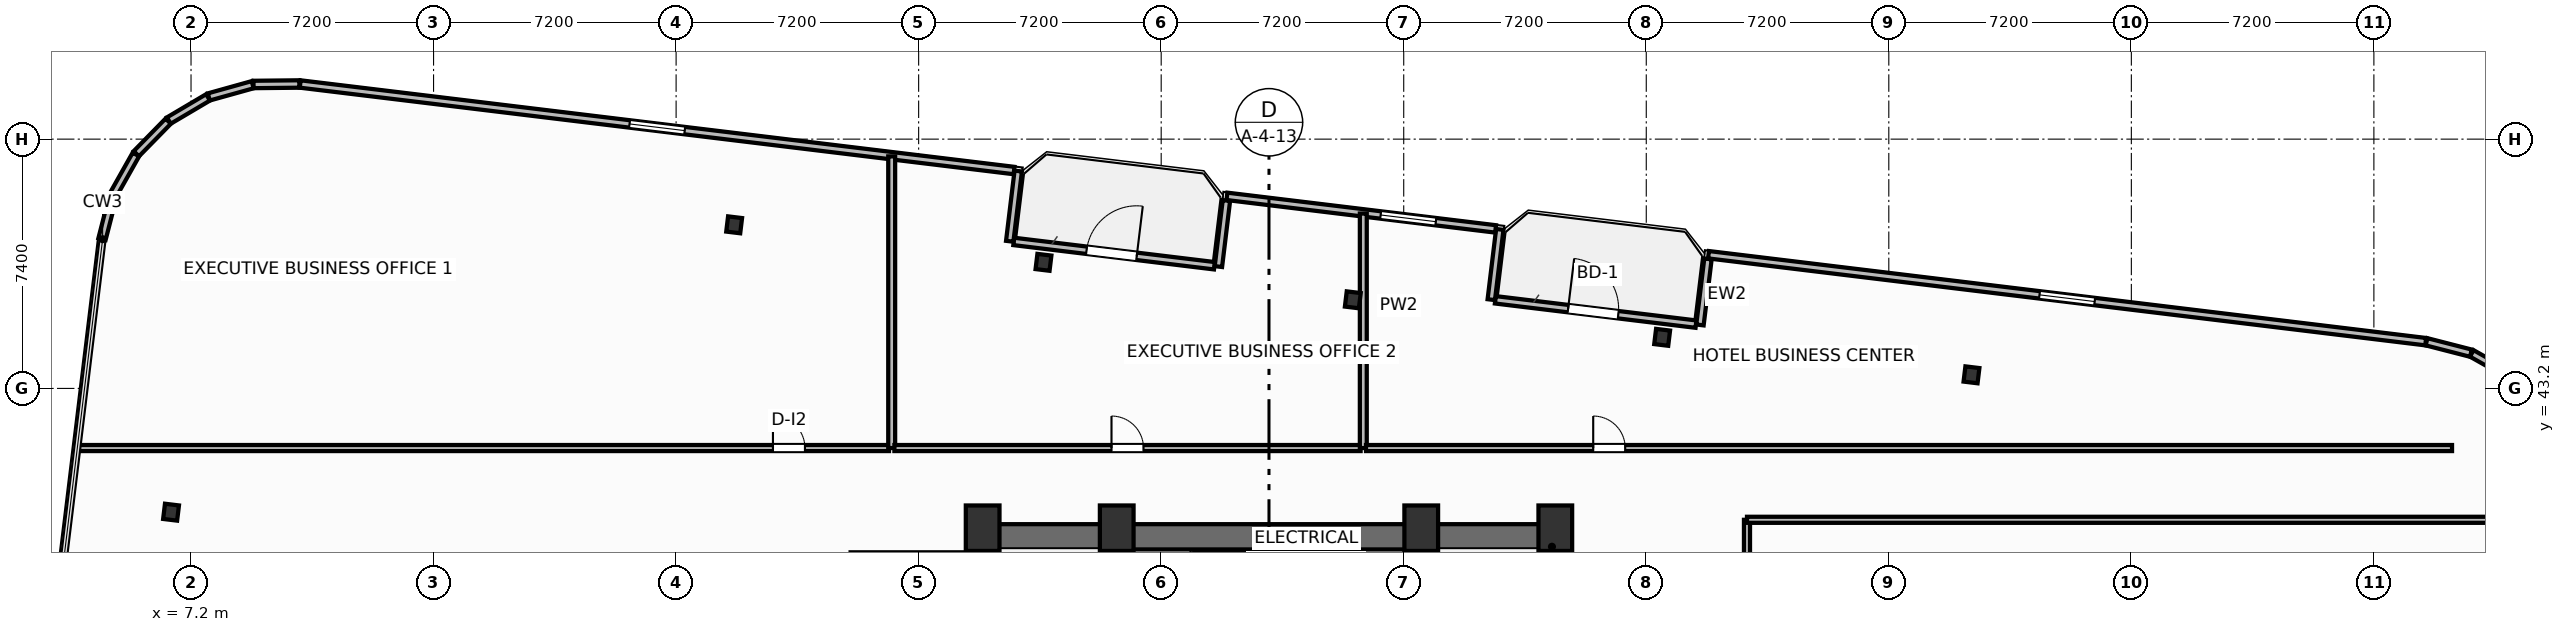
"""IFC4 building model, lengths in metres.
Left out: names, types, materials, properties, quantities, classifications, styles, units other than length and angle.
Written with IfcOpenShell. Run it as: python <this file> out.ifc"""

import sys

from ifc_helpers import new_model, si_unit, direction, frame, frame_2d, origin, origin_2d, place, context, subcontext, project, spatial, rectangle, i_section, extrude, element, fill, save


model = new_model("IFC4")
c1 = context("Model", 3, precision=1e-05, world=origin(), true_north=direction((0.0, 1.0)))
c2 = subcontext(c1, "Body", "Model", "MODEL_VIEW")
j1 = project(units=[si_unit("LENGTHUNIT", "METRE"), si_unit("PLANEANGLEUNIT", "RADIAN")], contexts=[c1])
p1 = place(None, origin())
s1 = spatial("IfcSite", under=j1, at=p1, CompositionType="ELEMENT")
p2 = place(p1, origin())
s2 = spatial("IfcBuilding", under=s1, at=p2, CompositionType="ELEMENT")
p3 = place(p2, frame((0.0, 0.0, 132.8)))
s3 = spatial("IfcBuildingStorey", under=s2, at=p3, CompositionType="ELEMENT", Elevation=132.8)
for number, where, z_axis, x_axis in (
    (1, (30.7, 39.05, 0.0), (0.0, 0.0, 1.0), (1.0, 0.0, 0.0)),
    (2, (34.68, 39.05, 0.0), (0.0, 0.0, 1.0), (1.0, 0.0, 0.0)),
    (3, (43.72, 39.05, 0.0), (0.0, 0.0, 1.0), (1.0, 0.0, 0.0)),
    (4, (47.7, 39.05, 0.0), (0.0, 0.0, 1.0), (1.0, 0.0, 0.0)),
):
    element("IfcColumn", number, at=place(p3, frame(where, z_axis=z_axis, x_axis=x_axis)), inside=s3, PredefinedType="COLUMN", context=c2, shape_type="SweptSolid", body=[
        extrude(rectangle(XDim=1.0, YDim=1.35, at=origin_2d()), origin(), (0.0, 0.0, 1.0), 3.7),
    ])
p4 = place(p3, frame((30.38, 38.795, 0.0), z_axis=(0.0, 0.0, 1.0), x_axis=(1.0, 0.0, 0.0)))
e5 = element("IfcWall", 5, at=p4, inside=s3, PredefinedType="SHEAR", context=c2, shape_type="SweptSolid", body=[
    extrude(rectangle(XDim=17.64, YDim=0.75, at=frame_2d((8.82, 0.0))), origin(), (0.0, 0.0, 1.0), 3.45),
])
for number, where, z_axis, x_axis in (
    (6, (30.755, 29.2, 0.0), (0.0, 0.0, 1.0), (0.0, 1.0, 0.0)),
    (7, (47.645, 29.2, 0.0), (0.0, 0.0, 1.0), (0.0, 1.0, 0.0)),
):
    element("IfcWall", number, at=place(p3, frame(where, z_axis=z_axis, x_axis=x_axis)), inside=s3, PredefinedType="SHEAR", context=c2, shape_type="SweptSolid", body=[
        extrude(rectangle(XDim=9.22, YDim=0.75, at=frame_2d((4.61, 0.0))), origin(), (0.0, 0.0, 1.0), 3.45),
    ])
p5 = place(p3, frame((34.64, 29.2, 0.0), z_axis=(0.0, 0.0, 1.0), x_axis=(0.0, 1.0, 0.0)))
e8 = element("IfcWall", 8, at=p5, inside=s3, PredefinedType="SHEAR", context=c2, shape_type="SweptSolid", body=[
    extrude(rectangle(XDim=9.22, YDim=0.25, at=frame_2d((4.61, 0.0))), origin(), (0.0, 0.0, 1.0), 3.45),
])
p6 = place(p5, frame((0.65, 0.0, 0.0)))
e9 = element("IfcOpeningElement", 9, at=p6, cuts=e8, PredefinedType="OPENING", context=c2, shape_type="SweptSolid", body=[
    extrude(rectangle(XDim=1.05, YDim=2.15, at=frame_2d((0.525, 1.075))), frame((0.0, 0.135, 0.0), z_axis=(0.0, -1.0, 0.0), x_axis=(1.0, 0.0, 0.0)), (0.0, 0.0, 1.0), 0.27),
])
p7 = place(p3, frame((43.76, 29.2, 0.0), z_axis=(0.0, 0.0, 1.0), x_axis=(0.0, 1.0, 0.0)))
e10 = element("IfcWall", 10, at=p7, inside=s3, PredefinedType="SHEAR", context=c2, shape_type="SweptSolid", body=[
    extrude(rectangle(XDim=9.22, YDim=0.25, at=frame_2d((4.61, 0.0))), origin(), (0.0, 0.0, 1.0), 3.45),
])
p8 = place(p7, frame((0.65, 0.0, 0.0)))
e11 = element("IfcOpeningElement", 11, at=p8, cuts=e10, PredefinedType="OPENING", context=c2, shape_type="SweptSolid", body=[
    extrude(rectangle(XDim=1.05, YDim=2.15, at=frame_2d((0.525, 1.075))), frame((0.0, 0.135, 0.0), z_axis=(0.0, -1.0, 0.0), x_axis=(1.0, 0.0, 0.0)), (0.0, 0.0, 1.0), 0.27),
])
for number, where, z_axis, x_axis in (
    (12, (60.054, 43.603, 0.0), (0.0, 0.0, 1.0), (0.993, -0.12, 0.0)),
    (13, (50.872, 44.717, 0.0), (0.0, 0.0, 1.0), (0.993, -0.12, 0.0)),
    (14, (41.689, 45.83, 0.0), (0.0, 0.0, 1.0), (0.993, -0.12, 0.0)),
    (15, (32.506, 46.943, 0.0), (0.0, 0.0, 1.0), (0.993, -0.12, 0.0)),
    (16, (23.323, 48.056, 0.0), (0.0, 0.0, 1.0), (0.993, -0.12, 0.0)),
    (17, (6.607, 39.526, 0.0), (0.0, 0.0, 1.0), (0.993, -0.12, 0.0)),
):
    element("IfcColumn", number, at=place(p3, frame(where, z_axis=z_axis, x_axis=x_axis)), inside=s3, PredefinedType="COLUMN", context=c2, shape_type="SweptSolid", body=[
        extrude(i_section(OverallWidth=0.418, OverallDepth=0.455, WebThickness=0.042, FlangeThickness=0.068, FilletRadius=0.025, at=origin_2d()), origin(), (0.0, 0.0, 1.0), 3.7),
    ])
p9 = place(p3, frame((31.624, 47.563, 0.0), z_axis=(0.0, 0.0, 1.0), x_axis=(0.992729951822, -0.120362962556, 0.0)))
e18 = element("IfcWall", 18, at=p9, inside=s3, PredefinedType="SOLIDWALL", context=c2, shape_type="SweptSolid", body=[
    extrude(rectangle(XDim=6.0, YDim=0.22, at=frame_2d((3.0, 0.0))), origin(), (0.0, 0.0, 1.0), 2.73),
])
p10 = place(p9, frame((2.176, 0.0, 0.0)))
e19 = element("IfcOpeningElement", 19, at=p10, cuts=e18, PredefinedType="OPENING", context=c2, shape_type="SweptSolid", body=[
    extrude(rectangle(XDim=1.5, YDim=2.25, at=frame_2d((0.75, 1.125))), frame((0.0, 0.12, 0.0), z_axis=(0.0, -1.0, 0.0), x_axis=(1.0, 0.0, 0.0)), (0.0, 0.0, 1.0), 0.24),
])
p11 = place(p3, frame((45.92, 45.831, 0.0), z_axis=(0.0, 0.0, 1.0), x_axis=(0.992729951822, -0.120362962556, 0.0)))
e20 = element("IfcWall", 20, at=p11, inside=s3, PredefinedType="SOLIDWALL", context=c2, shape_type="SweptSolid", body=[
    extrude(rectangle(XDim=6.0, YDim=0.22, at=frame_2d((3.0, 0.0))), origin(), (0.0, 0.0, 1.0), 2.73),
])
p12 = place(p11, frame((2.176, 0.0, 0.0)))
e21 = element("IfcOpeningElement", 21, at=p12, cuts=e20, PredefinedType="OPENING", context=c2, shape_type="SweptSolid", body=[
    extrude(rectangle(XDim=1.5, YDim=2.25, at=frame_2d((0.75, 1.125))), frame((0.0, 0.12, 0.0), z_axis=(0.0, -1.0, 0.0), x_axis=(1.0, 0.0, 0.0)), (0.0, 0.0, 1.0), 0.24),
])
p13 = place(p3, frame((76.084, 43.575, 0.0), z_axis=(0.0, 0.0, 1.0), x_axis=(-0.871093268227, 0.491117621399, 0.0)))
e22 = element("IfcWall", 22, at=p13, inside=s3, PredefinedType="SOLIDWALL", context=c2, shape_type="SweptSolid", body=[
    extrude(rectangle(XDim=1.353, YDim=0.22, at=frame_2d((0.677, 0.0))), origin(), (0.0, 0.0, 1.0), 2.73),
])
p14 = place(p3, frame((74.881, 44.246, 0.0), z_axis=(0.0, 0.0, 1.0), x_axis=(-0.968549775063, 0.248819881091, 0.0)))
e23 = element("IfcWall", 23, at=p14, inside=s3, PredefinedType="SOLIDWALL", context=c2, shape_type="SweptSolid", body=[
    extrude(rectangle(XDim=1.361, YDim=0.22, at=frame_2d((0.68, 0.0))), origin(), (0.0, 0.0, 1.0), 2.73),
])
p15 = place(p3, frame((73.538, 44.588, 0.0), z_axis=(0.0, 0.0, 1.0), x_axis=(-0.992733493583, 0.120333747213, 0.0)))
e24 = element("IfcWall", 24, at=p15, inside=s3, PredefinedType="SOLIDWALL", context=c2, shape_type="SweptSolid", body=[
    extrude(rectangle(XDim=21.447, YDim=0.22, at=frame_2d((10.724, 0.0))), origin(), (0.0, 0.0, 1.0), 2.73),
])
p16 = place(p15, frame((9.899, 0.0, 0.8)))
e25 = element("IfcOpeningElement", 25, at=p16, cuts=e24, PredefinedType="OPENING", context=c2, shape_type="SweptSolid", body=[
    extrude(rectangle(XDim=1.65, YDim=1.65, at=frame_2d((0.825, 0.825))), frame((0.0, 0.12, 0.0), z_axis=(0.0, -1.0, 0.0), x_axis=(1.0, 0.0, 0.0)), (0.0, 0.0, 1.0), 0.24),
])
p17 = place(p3, frame((52.231, 47.045, 0.0), z_axis=(0.0, 0.0, 1.0), x_axis=(-0.120275992932, -0.992740492538, 0.0)))
e26 = element("IfcWall", 26, at=p17, inside=s3, PredefinedType="SOLIDWALL", context=c2, shape_type="SweptSolid", body=[
    extrude(rectangle(XDim=1.975, YDim=0.22, at=frame_2d((0.988, 0.0))), origin(), (0.0, 0.0, 1.0), 2.73),
])
p18 = place(p3, frame((45.799, 45.835, 0.0), z_axis=(0.0, 0.0, 1.0), x_axis=(0.120314009587, 0.992735885871, 0.0)))
e27 = element("IfcWall", 27, at=p18, inside=s3, PredefinedType="SOLIDWALL", context=c2, shape_type="SweptSolid", body=[
    extrude(rectangle(XDim=2.1, YDim=0.22, at=frame_2d((1.05, 0.0))), origin(), (0.0, 0.0, 1.0), 2.73),
])
p19 = place(p3, frame((45.928, 47.935, 0.0), z_axis=(0.0, 0.0, 1.0), x_axis=(-0.992730591876, 0.120357683402, 0.0)))
e28 = element("IfcWall", 28, at=p19, inside=s3, PredefinedType="SOLIDWALL", context=c2, shape_type="SweptSolid", body=[
    extrude(rectangle(XDim=8.035, YDim=0.22, at=frame_2d((4.017, 0.0))), origin(), (0.0, 0.0, 1.0), 2.73),
])
p20 = place(p19, frame((1.788, 0.0, 0.8)))
e29 = element("IfcOpeningElement", 29, at=p20, cuts=e28, PredefinedType="OPENING", context=c2, shape_type="SweptSolid", body=[
    extrude(rectangle(XDim=1.65, YDim=1.65, at=frame_2d((0.825, 0.825))), frame((0.0, 0.12, 0.0), z_axis=(0.0, -1.0, 0.0), x_axis=(1.0, 0.0, 0.0)), (0.0, 0.0, 1.0), 0.24),
])
p21 = place(p3, frame((37.936, 48.778, 0.0), z_axis=(0.0, 0.0, 1.0), x_axis=(-0.120397815541, -0.992725725472, 0.0)))
e30 = element("IfcWall", 30, at=p21, inside=s3, PredefinedType="SOLIDWALL", context=c2, shape_type="SweptSolid", body=[
    extrude(rectangle(XDim=1.975, YDim=0.22, at=frame_2d((0.988, 0.0))), origin(), (0.0, 0.0, 1.0), 2.73),
])
p22 = place(p3, frame((31.504, 47.568, 0.0), z_axis=(0.0, 0.0, 1.0), x_axis=(0.120341784665, 0.992732519294, 0.0)))
e31 = element("IfcWall", 31, at=p22, inside=s3, PredefinedType="SOLIDWALL", context=c2, shape_type="SweptSolid", body=[
    extrude(rectangle(XDim=2.1, YDim=0.22, at=frame_2d((1.05, 0.0))), origin(), (0.0, 0.0, 1.0), 2.73),
])
p23 = place(p3, frame((31.633, 49.668, 0.0), z_axis=(0.0, 0.0, 1.0), x_axis=(-0.992731670483, 0.120348786531, 0.0)))
e32 = element("IfcWall", 32, at=p23, inside=s3, PredefinedType="SOLIDWALL", context=c2, shape_type="SweptSolid", body=[
    extrude(rectangle(XDim=21.347, YDim=0.22, at=frame_2d((10.674, 0.0))), origin(), (0.0, 0.0, 1.0), 2.73),
])
p24 = place(p23, frame((9.849, 0.0, 0.8)))
e33 = element("IfcOpeningElement", 33, at=p24, cuts=e32, PredefinedType="OPENING", context=c2, shape_type="SweptSolid", body=[
    extrude(rectangle(XDim=1.65, YDim=1.65, at=frame_2d((0.825, 0.825))), frame((0.0, 0.12, 0.0), z_axis=(0.0, -1.0, 0.0), x_axis=(1.0, 0.0, 0.0)), (0.0, 0.0, 1.0), 0.24),
])
p25 = place(p3, frame((10.416, 52.237, 0.0), z_axis=(0.0, 0.0, 1.0), x_axis=(-0.999947718056, -0.010225514878, 0.0)))
e34 = element("IfcWall", 34, at=p25, inside=s3, PredefinedType="SOLIDWALL", context=c2, shape_type="SweptSolid", body=[
    extrude(rectangle(XDim=1.361, YDim=0.22, at=frame_2d((0.68, 0.0))), origin(), (0.0, 0.0, 1.0), 2.73),
])
for number, where, z_axis, x_axis in (
    (35, (9.031, 52.216, 0.0), (0.0, 0.0, 1.0), (-0.963, -0.269, 0.0)),
    (36, (7.706, 51.84, 0.0), (0.0, 0.0, 1.0), (-0.861, -0.509, 0.0)),
):
    element("IfcWall", number, at=place(p3, frame(where, z_axis=z_axis, x_axis=x_axis)), inside=s3, PredefinedType="SOLIDWALL", context=c2, shape_type="SweptSolid", body=[
        extrude(rectangle(XDim=1.353, YDim=0.22, at=frame_2d((0.677, 0.0))), origin(), (0.0, 0.0, 1.0), 2.73),
    ])
p26 = place(p3, frame((6.523, 51.133, 0.0), z_axis=(0.0, 0.0, 1.0), x_axis=(-0.699762925925, -0.714375144795, 0.0)))
e37 = element("IfcWall", 37, at=p26, inside=s3, PredefinedType="SOLIDWALL", context=c2, shape_type="SweptSolid", body=[
    extrude(rectangle(XDim=1.353, YDim=0.22, at=frame_2d((0.677, 0.0))), origin(), (0.0, 0.0, 1.0), 2.73),
])
p27 = place(p3, frame((5.564, 50.145, 0.0), z_axis=(0.0, 0.0, 1.0), x_axis=(-0.491117621399, -0.871093268227, 0.0)))
e38 = element("IfcWall", 38, at=p27, inside=s3, PredefinedType="SOLIDWALL", context=c2, shape_type="SweptSolid", body=[
    extrude(rectangle(XDim=1.353, YDim=0.22, at=frame_2d((0.677, 0.0))), origin(), (0.0, 0.0, 1.0), 2.73),
])
p28 = place(p3, frame((4.894, 48.942, 0.0), z_axis=(0.0, 0.0, 1.0), x_axis=(-0.248857256909, -0.968540172468, 0.0)))
e39 = element("IfcWall", 39, at=p28, inside=s3, PredefinedType="SOLIDWALL", context=c2, shape_type="SweptSolid", body=[
    extrude(rectangle(XDim=1.353, YDim=0.22, at=frame_2d((0.676, 0.0))), origin(), (0.0, 0.0, 1.0), 2.73),
])
p29 = place(p3, frame((3.864, 41.43, 0.0), z_axis=(0.0, 0.0, 1.0), x_axis=(1.0, 0.0, 0.0)))
e40 = element("IfcWall", 40, at=p29, inside=s3, PredefinedType="PARTITIONING", context=c2, shape_type="SweptSolid", body=[
    extrude(rectangle(XDim=24.056, YDim=0.18, at=frame_2d((12.028, 0.0))), origin(), (0.0, 0.0, 1.0), 3.45),
])
p30 = place(p29, frame((20.611, 0.0, 0.0)))
e41 = element("IfcOpeningElement", 41, at=p30, cuts=e40, PredefinedType="OPENING", context=c2, shape_type="SweptSolid", body=[
    extrude(rectangle(XDim=0.95, YDim=2.05, at=frame_2d((0.475, 1.025))), frame((0.0, 0.1, 0.0), z_axis=(0.0, -1.0, 0.0), x_axis=(1.0, 0.0, 0.0)), (0.0, 0.0, 1.0), 0.2),
])
p31 = place(p3, frame((28.0, 41.43, 0.0), z_axis=(0.0, 0.0, 1.0), x_axis=(0.0, 1.0, 0.0)))
e42 = element("IfcWall", 42, at=p31, inside=s3, PredefinedType="PARTITIONING", context=c2, shape_type="SweptSolid", body=[
    extrude(rectangle(XDim=8.658, YDim=0.205, at=frame_2d((4.329, 0.0))), origin(), (0.0, 0.0, 1.0), 3.45),
])
p32 = place(p3, frame((28.08, 41.43, 0.0), z_axis=(0.0, 0.0, 1.0), x_axis=(1.0, 0.0, 0.0)))
e43 = element("IfcWall", 43, at=p32, inside=s3, PredefinedType="PARTITIONING", context=c2, shape_type="SweptSolid", body=[
    extrude(rectangle(XDim=13.84, YDim=0.18, at=frame_2d((6.92, 0.0))), origin(), (0.0, 0.0, 1.0), 3.45),
])
p33 = place(p32, frame((6.445, 0.0, 0.0)))
e44 = element("IfcOpeningElement", 44, at=p33, cuts=e43, PredefinedType="OPENING", context=c2, shape_type="SweptSolid", body=[
    extrude(rectangle(XDim=0.95, YDim=2.05, at=frame_2d((0.475, 1.025))), frame((0.0, 0.1, 0.0), z_axis=(0.0, -1.0, 0.0), x_axis=(1.0, 0.0, 0.0)), (0.0, 0.0, 1.0), 0.2),
])
p34 = place(p3, frame((42.0, 41.43, 0.0), z_axis=(0.0, 0.0, 1.0), x_axis=(0.0, 1.0, 0.0)))
e45 = element("IfcWall", 45, at=p34, inside=s3, PredefinedType="PARTITIONING", context=c2, shape_type="SweptSolid", body=[
    extrude(rectangle(XDim=6.961, YDim=0.205, at=frame_2d((3.48, 0.0))), origin(), (0.0, 0.0, 1.0), 2.662),
])
p35 = place(p3, frame((42.08, 41.43, 0.0), z_axis=(0.0, 0.0, 1.0), x_axis=(1.0, 0.0, 0.0)))
e46 = element("IfcWall", 46, at=p35, inside=s3, PredefinedType="PARTITIONING", context=c2, shape_type="SweptSolid", body=[
    extrude(rectangle(XDim=32.24, YDim=0.18, at=frame_2d((16.12, 0.0))), origin(), (0.0, 0.0, 1.0), 3.45),
])
p36 = place(p35, frame((6.745, 0.0, 0.0)))
e47 = element("IfcOpeningElement", 47, at=p36, cuts=e46, PredefinedType="OPENING", context=c2, shape_type="SweptSolid", body=[
    extrude(rectangle(XDim=0.95, YDim=2.05, at=frame_2d((0.475, 1.025))), frame((0.0, 0.1, 0.0), z_axis=(0.0, -1.0, 0.0), x_axis=(1.0, 0.0, 0.0)), (0.0, 0.0, 1.0), 0.2),
])
p37 = place(p3, frame((53.39, 19.24, 0.0), z_axis=(0.0, 0.0, 1.0), x_axis=(0.0, 1.0, 0.0)))
e48 = element("IfcWall", 48, at=p37, inside=s3, PredefinedType="PARTITIONING", context=c2, shape_type="SweptSolid", body=[
    extrude(rectangle(XDim=20.06, YDim=0.18, at=frame_2d((10.03, 0.0))), origin(), (0.0, 0.0, 1.0), 3.45),
])
p38 = place(p37, frame((7.7, 0.0, 0.0)))
e49 = element("IfcOpeningElement", 49, at=p38, cuts=e48, PredefinedType="OPENING", context=c2, shape_type="SweptSolid", body=[
    extrude(rectangle(XDim=0.95, YDim=2.05, at=frame_2d((0.475, 1.025))), frame((0.0, 0.1, 0.0), z_axis=(0.0, -1.0, 0.0), x_axis=(1.0, 0.0, 0.0)), (0.0, 0.0, 1.0), 0.2),
])
p39 = place(p3, frame((53.39, 39.3, 0.0), z_axis=(0.0, 0.0, 1.0), x_axis=(1.0, 0.0, 0.0)))
e50 = element("IfcWall", 50, at=p39, inside=s3, PredefinedType="PARTITIONING", context=c2, shape_type="SweptSolid", body=[
    extrude(rectangle(XDim=24.74, YDim=0.18, at=frame_2d((12.37, 0.0))), origin(), (0.0, 0.0, 1.0), 3.45),
])
p40 = place(p10, origin())
e51 = element("IfcDoor", 51, at=p40, inside=s3, OperationType="SINGLE_SWING_RIGHT", PredefinedType="DOOR", context=c2, shape_type="SweptSolid", body=[
    extrude(rectangle(XDim=1.5, YDim=2.25, at=frame_2d((0.75, 1.125))), frame((0.0, 0.025, 0.0), z_axis=(0.0, -1.0, 0.0), x_axis=(1.0, 0.0, 0.0)), (0.0, 0.0, 1.0), 0.05),
])
fill(e19, e51)
p41 = place(p12, origin())
e52 = element("IfcDoor", 52, at=p41, inside=s3, OperationType="SINGLE_SWING_LEFT", PredefinedType="DOOR", context=c2, shape_type="SweptSolid", body=[
    extrude(rectangle(XDim=1.5, YDim=2.25, at=frame_2d((0.75, 1.125))), frame((0.0, 0.025, 0.0), z_axis=(0.0, -1.0, 0.0), x_axis=(1.0, 0.0, 0.0)), (0.0, 0.0, 1.0), 0.05),
])
fill(e21, e52)
p42 = place(p16, origin())
e53 = element("IfcWindow", 53, at=p42, inside=s3, PartitioningType="SINGLE_PANEL", PredefinedType="WINDOW", context=c2, shape_type="SweptSolid", body=[
    extrude(rectangle(XDim=1.65, YDim=1.65, at=frame_2d((0.825, 0.825))), frame((0.0, 0.03, 0.0), z_axis=(0.0, -1.0, 0.0), x_axis=(1.0, 0.0, 0.0)), (0.0, 0.0, 1.0), 0.06),
])
fill(e25, e53)
p43 = place(p20, origin())
e54 = element("IfcWindow", 54, at=p43, inside=s3, PartitioningType="SINGLE_PANEL", PredefinedType="WINDOW", context=c2, shape_type="SweptSolid", body=[
    extrude(rectangle(XDim=1.65, YDim=1.65, at=frame_2d((0.825, 0.825))), frame((0.0, 0.03, 0.0), z_axis=(0.0, -1.0, 0.0), x_axis=(1.0, 0.0, 0.0)), (0.0, 0.0, 1.0), 0.06),
])
fill(e29, e54)
p44 = place(p24, origin())
e55 = element("IfcWindow", 55, at=p44, inside=s3, PartitioningType="SINGLE_PANEL", PredefinedType="WINDOW", context=c2, shape_type="SweptSolid", body=[
    extrude(rectangle(XDim=1.65, YDim=1.65, at=frame_2d((0.825, 0.825))), frame((0.0, 0.03, 0.0), z_axis=(0.0, -1.0, 0.0), x_axis=(1.0, 0.0, 0.0)), (0.0, 0.0, 1.0), 0.06),
])
fill(e33, e55)
p45 = place(p30, origin())
e56 = element("IfcDoor", 56, at=p45, inside=s3, OperationType="SINGLE_SWING_LEFT", PredefinedType="DOOR", context=c2, shape_type="SweptSolid", body=[
    extrude(rectangle(XDim=0.95, YDim=2.05, at=frame_2d((0.475, 1.025))), frame((0.0, 0.025, 0.0), z_axis=(0.0, -1.0, 0.0), x_axis=(1.0, 0.0, 0.0)), (0.0, 0.0, 1.0), 0.05),
])
fill(e41, e56)
p46 = place(p33, origin())
e57 = element("IfcDoor", 57, at=p46, inside=s3, OperationType="SINGLE_SWING_LEFT", PredefinedType="DOOR", context=c2, shape_type="SweptSolid", body=[
    extrude(rectangle(XDim=0.95, YDim=2.05, at=frame_2d((0.475, 1.025))), frame((0.0, 0.025, 0.0), z_axis=(0.0, -1.0, 0.0), x_axis=(1.0, 0.0, 0.0)), (0.0, 0.0, 1.0), 0.05),
])
fill(e44, e57)
p47 = place(p36, origin())
e58 = element("IfcDoor", 58, at=p47, inside=s3, OperationType="SINGLE_SWING_LEFT", PredefinedType="DOOR", context=c2, shape_type="SweptSolid", body=[
    extrude(rectangle(XDim=0.95, YDim=2.05, at=frame_2d((0.475, 1.025))), frame((0.0, 0.025, 0.0), z_axis=(0.0, -1.0, 0.0), x_axis=(1.0, 0.0, 0.0)), (0.0, 0.0, 1.0), 0.05),
])
fill(e47, e58)
save(model, sys.argv[1])
